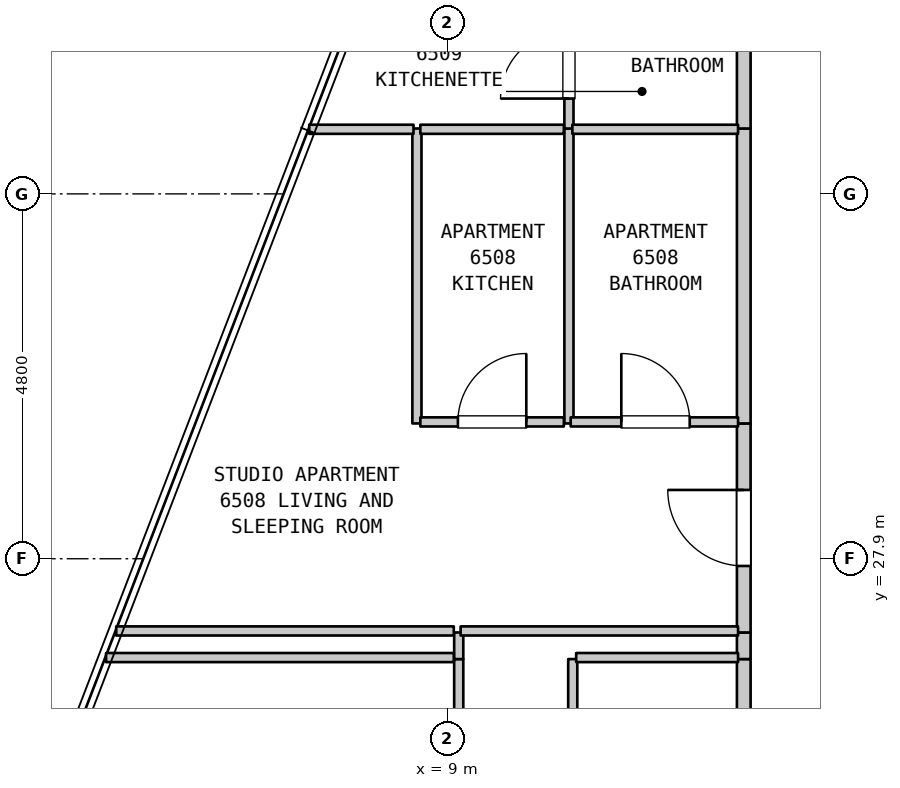
"""IFC4 building model, lengths in metres.
Left out: names, types, materials, properties, quantities, classifications, styles, units other than length and angle.
Written with IfcOpenShell. Run it as: python <this file> out.ifc"""

import sys

from ifc_helpers import new_model, si_unit, direction, frame, frame_2d, origin, place, context, subcontext, project, spatial, rectangle, extrude, element, fill, save


model = new_model("IFC4")
c1 = context("Model", 3, precision=1e-05, world=origin(), true_north=direction((0.0, 1.0)))
c2 = subcontext(c1, "Body", "Model", "MODEL_VIEW")
j1 = project(units=[si_unit("LENGTHUNIT", "METRE"), si_unit("PLANEANGLEUNIT", "RADIAN")], contexts=[c1])
p1 = place(None, origin())
s1 = spatial("IfcSite", under=j1, at=p1, CompositionType="ELEMENT")
p2 = place(p1, origin())
s2 = spatial("IfcBuilding", under=s1, at=p2, CompositionType="ELEMENT")
p3 = place(p2, frame((0.0, 0.0, 262.1)))
s3 = spatial("IfcBuildingStorey", under=s2, at=p3, CompositionType="ELEMENT", Elevation=262.1)
p4 = place(p3, frame((8.6, 29.68, 0.0), z_axis=(0.0, 0.0, 1.0), x_axis=(0.0, 1.0, 0.0)))
e1 = element("IfcWall", 1, at=p4, inside=s3, PredefinedType="PARTITIONING", context=c2, shape_type="SweptSolid", body=[
    extrude(rectangle(XDim=3.88, YDim=0.12, at=frame_2d((1.94, 0.0))), origin(), (0.0, 0.0, 1.0), 3.39),
])
p5 = place(p3, frame((9.15, 20.5, 0.0), z_axis=(0.0, 0.0, 1.0), x_axis=(0.0, 1.0, 0.0)))
e2 = element("IfcWall", 2, at=p5, inside=s3, PredefinedType="PARTITIONING", context=c2, shape_type="SweptSolid", body=[
    extrude(rectangle(XDim=6.08, YDim=0.12, at=frame_2d((3.04, 0.0))), origin(), (0.0, 0.0, 1.0), 2.79),
])
p6 = place(p5, frame((1.173, 0.0, 0.0)))
e3 = element("IfcOpeningElement", 3, at=p6, cuts=e2, PredefinedType="OPENING", context=c2, shape_type="SweptSolid", body=[
    extrude(rectangle(XDim=0.9, YDim=2.15, at=frame_2d((0.45, 1.075))), frame((0.0, 0.07, 0.0), z_axis=(0.0, -1.0, 0.0), x_axis=(1.0, 0.0, 0.0)), (0.0, 0.0, 1.0), 0.14),
])
p7 = place(p5, frame((3.863, 0.0, 0.0)))
e4 = element("IfcOpeningElement", 4, at=p7, cuts=e2, PredefinedType="OPENING", context=c2, shape_type="SweptSolid", body=[
    extrude(rectangle(XDim=0.9, YDim=2.15, at=frame_2d((0.45, 1.075))), frame((0.0, 0.07, 0.0), z_axis=(0.0, -1.0, 0.0), x_axis=(1.0, 0.0, 0.0)), (0.0, 0.0, 1.0), 0.14),
])
p8 = place(p3, frame((9.15, 26.58, 0.0), z_axis=(0.0, 0.0, 1.0), x_axis=(0.0, 1.0, 0.0)))
e5 = element("IfcWall", 5, at=p8, inside=s3, PredefinedType="PARTITIONING", context=c2, shape_type="SweptSolid", body=[
    extrude(rectangle(XDim=0.35, YDim=0.12, at=frame_2d((0.175, 0.0))), origin(), (0.0, 0.0, 1.0), 3.39),
])
p9 = place(p3, frame((10.6, 29.68, 0.0), z_axis=(0.0, 0.0, 1.0), x_axis=(0.0, 1.0, 0.0)))
e6 = element("IfcWall", 6, at=p9, inside=s3, PredefinedType="PARTITIONING", context=c2, shape_type="SweptSolid", body=[
    extrude(rectangle(XDim=3.88, YDim=0.12, at=frame_2d((1.94, 0.0))), origin(), (0.0, 0.0, 1.0), 3.39),
])
p10 = place(p3, frame((10.6, 33.56, 0.0), z_axis=(0.0, 0.0, 1.0), x_axis=(0.0, 1.0, 0.0)))
e7 = element("IfcWall", 7, at=p10, inside=s3, PredefinedType="PARTITIONING", context=c2, shape_type="SweptSolid", body=[
    extrude(rectangle(XDim=1.831, YDim=0.12, at=frame_2d((0.916, 0.0))), origin(), (0.0, 0.0, 1.0), 3.39),
])
p11 = place(p10, frame((0.394, 0.0, 0.0)))
e8 = element("IfcOpeningElement", 8, at=p11, cuts=e7, PredefinedType="OPENING", context=c2, shape_type="SweptSolid", body=[
    extrude(rectangle(XDim=0.9, YDim=2.15, at=frame_2d((0.45, 1.075))), frame((0.0, 0.07, 0.0), z_axis=(0.0, -1.0, 0.0), x_axis=(1.0, 0.0, 0.0)), (0.0, 0.0, 1.0), 0.14),
])
p12 = place(p3, frame((10.65, 23.662, 0.0), z_axis=(0.0, 0.0, 1.0), x_axis=(0.0, 1.0, 0.0)))
e9 = element("IfcWall", 9, at=p12, inside=s3, PredefinedType="PARTITIONING", context=c2, shape_type="SweptSolid", body=[
    extrude(rectangle(XDim=2.918, YDim=0.12, at=frame_2d((1.459, 0.0))), origin(), (0.0, 0.0, 1.0), 3.39),
])
p13 = place(p12, frame((1.009, 0.0, 0.0)))
e10 = element("IfcOpeningElement", 10, at=p13, cuts=e9, PredefinedType="OPENING", context=c2, shape_type="SweptSolid", body=[
    extrude(rectangle(XDim=0.9, YDim=2.1, at=frame_2d((0.45, 1.05))), frame((0.0, 0.07, 0.0), z_axis=(0.0, -1.0, 0.0), x_axis=(1.0, 0.0, 0.0)), (0.0, 0.0, 1.0), 0.14),
])
p14 = place(p3, frame((12.9, 23.662, 0.0), z_axis=(0.0, 0.0, 1.0), x_axis=(0.0, 1.0, 0.0)))
e11 = element("IfcWall", 11, at=p14, inside=s3, PredefinedType="STANDARD", context=c2, shape_type="SweptSolid", body=[
    extrude(rectangle(XDim=2.918, YDim=0.18, at=frame_2d((1.459, 0.0))), origin(), (0.0, 0.0, 1.0), 3.39),
])
p15 = place(p3, frame((12.9, 26.58, 0.0), z_axis=(0.0, 0.0, 1.0), x_axis=(0.0, 1.0, 0.0)))
e12 = element("IfcWall", 12, at=p15, inside=s3, PredefinedType="STANDARD", context=c2, shape_type="SweptSolid", body=[
    extrude(rectangle(XDim=0.35, YDim=0.18, at=frame_2d((0.175, 0.0))), origin(), (0.0, 0.0, 1.0), 3.39),
])
p16 = place(p3, frame((12.9, 26.93, 0.0), z_axis=(0.0, 0.0, 1.0), x_axis=(0.0, 1.0, 0.0)))
e13 = element("IfcWall", 13, at=p16, inside=s3, PredefinedType="STANDARD", context=c2, shape_type="SweptSolid", body=[
    extrude(rectangle(XDim=2.75, YDim=0.18, at=frame_2d((1.375, 0.0))), origin(), (0.0, 0.0, 1.0), 3.39),
])
p17 = place(p16, frame((0.875, 0.0, 0.0)))
e14 = element("IfcOpeningElement", 14, at=p17, cuts=e13, PredefinedType="OPENING", context=c2, shape_type="SweptSolid", body=[
    extrude(rectangle(XDim=1.0, YDim=2.15, at=frame_2d((0.5, 1.075))), frame((0.0, 0.1, 0.0), z_axis=(0.0, -1.0, 0.0), x_axis=(1.0, 0.0, 0.0)), (0.0, 0.0, 1.0), 0.2),
])
p18 = place(p3, frame((12.9, 29.68, 0.0), z_axis=(0.0, 0.0, 1.0), x_axis=(0.0, 1.0, 0.0)))
e15 = element("IfcWall", 15, at=p18, inside=s3, PredefinedType="STANDARD", context=c2, shape_type="SweptSolid", body=[
    extrude(rectangle(XDim=3.88, YDim=0.18, at=frame_2d((1.94, 0.0))), origin(), (0.0, 0.0, 1.0), 3.39),
])
p19 = place(p3, frame((12.9, 33.56, 0.0), z_axis=(0.0, 0.0, 1.0), x_axis=(0.0, 1.0, 0.0)))
e16 = element("IfcWall", 16, at=p19, inside=s3, PredefinedType="STANDARD", context=c2, shape_type="SweptSolid", body=[
    extrude(rectangle(XDim=1.831, YDim=0.18, at=frame_2d((0.916, 0.0))), origin(), (0.0, 0.0, 1.0), 3.39),
])
p20 = place(p3, frame((4.51, 26.6, 0.0), z_axis=(0.0, 0.0, 1.0), x_axis=(1.0, 0.0, 0.0)))
e17 = element("IfcWall", 17, at=p20, inside=s3, PredefinedType="PARTITIONING", context=c2, shape_type="SweptSolid", body=[
    extrude(rectangle(XDim=4.575, YDim=0.12, at=frame_2d((2.288, 0.0))), origin(), (0.0, 0.0, 1.0), 3.39),
])
p21 = place(p3, frame((10.695, 26.6, 0.0), z_axis=(0.0, 0.0, 1.0), x_axis=(1.0, 0.0, 0.0)))
e18 = element("IfcWall", 18, at=p21, inside=s3, PredefinedType="PARTITIONING", context=c2, shape_type="SweptSolid", body=[
    extrude(rectangle(XDim=2.13, YDim=0.12, at=frame_2d((1.065, 0.0))), origin(), (0.0, 0.0, 1.0), 3.39),
])
p22 = place(p3, frame((4.644, 26.95, 0.0), z_axis=(0.0, 0.0, 1.0), x_axis=(1.0, 0.0, 0.0)))
e19 = element("IfcWall", 19, at=p22, inside=s3, PredefinedType="PARTITIONING", context=c2, shape_type="SweptSolid", body=[
    extrude(rectangle(XDim=4.441, YDim=0.12, at=frame_2d((2.22, 0.0))), origin(), (0.0, 0.0, 1.0), 3.39),
])
p23 = place(p3, frame((9.175, 26.95, 0.0), z_axis=(0.0, 0.0, 1.0), x_axis=(1.0, 0.0, 0.0)))
e20 = element("IfcWall", 20, at=p23, inside=s3, PredefinedType="PARTITIONING", context=c2, shape_type="SweptSolid", body=[
    extrude(rectangle(XDim=3.65, YDim=0.12, at=frame_2d((1.825, 0.0))), origin(), (0.0, 0.0, 1.0), 3.39),
])
p24 = place(p3, frame((8.645, 29.7, 0.0), z_axis=(0.0, 0.0, 1.0), x_axis=(1.0, 0.0, 0.0)))
e21 = element("IfcWall", 21, at=p24, inside=s3, PredefinedType="PARTITIONING", context=c2, shape_type="SweptSolid", body=[
    extrude(rectangle(XDim=1.888, YDim=0.12, at=frame_2d((0.944, 0.0))), origin(), (0.0, 0.0, 1.0), 3.39),
])
p25 = place(p24, frame((0.494, 0.0, 0.0)))
e22 = element("IfcOpeningElement", 22, at=p25, cuts=e21, PredefinedType="OPENING", context=c2, shape_type="SweptSolid", body=[
    extrude(rectangle(XDim=0.9, YDim=2.15, at=frame_2d((0.45, 1.075))), frame((0.0, 0.07, 0.0), z_axis=(0.0, -1.0, 0.0), x_axis=(1.0, 0.0, 0.0)), (0.0, 0.0, 1.0), 0.14),
])
p26 = place(p3, frame((10.623, 29.7, 0.0), z_axis=(0.0, 0.0, 1.0), x_axis=(1.0, 0.0, 0.0)))
e23 = element("IfcWall", 23, at=p26, inside=s3, PredefinedType="PARTITIONING", context=c2, shape_type="SweptSolid", body=[
    extrude(rectangle(XDim=2.202, YDim=0.12, at=frame_2d((1.101, 0.0))), origin(), (0.0, 0.0, 1.0), 3.39),
])
p27 = place(p26, frame((0.666, 0.0, 0.0)))
e24 = element("IfcOpeningElement", 24, at=p27, cuts=e23, PredefinedType="OPENING", context=c2, shape_type="SweptSolid", body=[
    extrude(rectangle(XDim=0.9, YDim=2.1, at=frame_2d((0.45, 1.05))), frame((0.0, 0.07, 0.0), z_axis=(0.0, -1.0, 0.0), x_axis=(1.0, 0.0, 0.0)), (0.0, 0.0, 1.0), 0.14),
])
p28 = place(p3, frame((7.183, 33.55, 0.0), z_axis=(0.0, 0.0, 1.0), x_axis=(1.0, 0.0, 0.0)))
e25 = element("IfcWall", 25, at=p28, inside=s3, PredefinedType="PARTITIONING", context=c2, shape_type="SweptSolid", body=[
    extrude(rectangle(XDim=1.372, YDim=0.12, at=frame_2d((0.686, 0.0))), origin(), (0.0, 0.0, 1.0), 3.39),
])
p29 = place(p3, frame((8.645, 33.55, 0.0), z_axis=(0.0, 0.0, 1.0), x_axis=(1.0, 0.0, 0.0)))
e26 = element("IfcWall", 26, at=p29, inside=s3, PredefinedType="PARTITIONING", context=c2, shape_type="SweptSolid", body=[
    extrude(rectangle(XDim=1.888, YDim=0.12, at=frame_2d((0.944, 0.0))), origin(), (0.0, 0.0, 1.0), 3.39),
])
p30 = place(p3, frame((10.645, 33.55, 0.0), z_axis=(0.0, 0.0, 1.0), x_axis=(1.0, 0.0, 0.0)))
e27 = element("IfcWall", 27, at=p30, inside=s3, PredefinedType="PARTITIONING", context=c2, shape_type="SweptSolid", body=[
    extrude(rectangle(XDim=2.18, YDim=0.12, at=frame_2d((1.09, 0.0))), origin(), (0.0, 0.0, 1.0), 3.39),
])
p31 = place(p11, origin())
e28 = element("IfcDoor", 28, at=p31, inside=s3, OperationType="SINGLE_SWING_LEFT", PredefinedType="DOOR", context=c2, shape_type="SweptSolid", body=[
    extrude(rectangle(XDim=0.9, YDim=2.15, at=frame_2d((0.45, 1.075))), frame((0.0, 0.025, 0.0), z_axis=(0.0, -1.0, 0.0), x_axis=(1.0, 0.0, 0.0)), (0.0, 0.0, 1.0), 0.05),
])
fill(e8, e28)
p32 = place(p17, origin())
e29 = element("IfcDoor", 29, at=p32, inside=s3, OperationType="SINGLE_SWING_RIGHT", PredefinedType="DOOR", context=c2, shape_type="SweptSolid", body=[
    extrude(rectangle(XDim=1.0, YDim=2.15, at=frame_2d((0.5, 1.075))), frame((0.0, 0.025, 0.0), z_axis=(0.0, -1.0, 0.0), x_axis=(1.0, 0.0, 0.0)), (0.0, 0.0, 1.0), 0.05),
])
fill(e14, e29)
p33 = place(p25, origin())
e30 = element("IfcDoor", 30, at=p33, inside=s3, OperationType="SINGLE_SWING_RIGHT", PredefinedType="DOOR", context=c2, shape_type="SweptSolid", body=[
    extrude(rectangle(XDim=0.9, YDim=2.15, at=frame_2d((0.45, 1.075))), frame((0.0, 0.025, 0.0), z_axis=(0.0, -1.0, 0.0), x_axis=(1.0, 0.0, 0.0)), (0.0, 0.0, 1.0), 0.05),
])
fill(e22, e30)
p34 = place(p27, origin())
e31 = element("IfcDoor", 31, at=p34, inside=s3, OperationType="SINGLE_SWING_LEFT", PredefinedType="DOOR", context=c2, shape_type="SweptSolid", body=[
    extrude(rectangle(XDim=0.9, YDim=2.1, at=frame_2d((0.45, 1.05))), frame((0.0, 0.025, 0.0), z_axis=(0.0, -1.0, 0.0), x_axis=(1.0, 0.0, 0.0)), (0.0, 0.0, 1.0), 0.05),
])
fill(e24, e31)
save(model, sys.argv[1])
